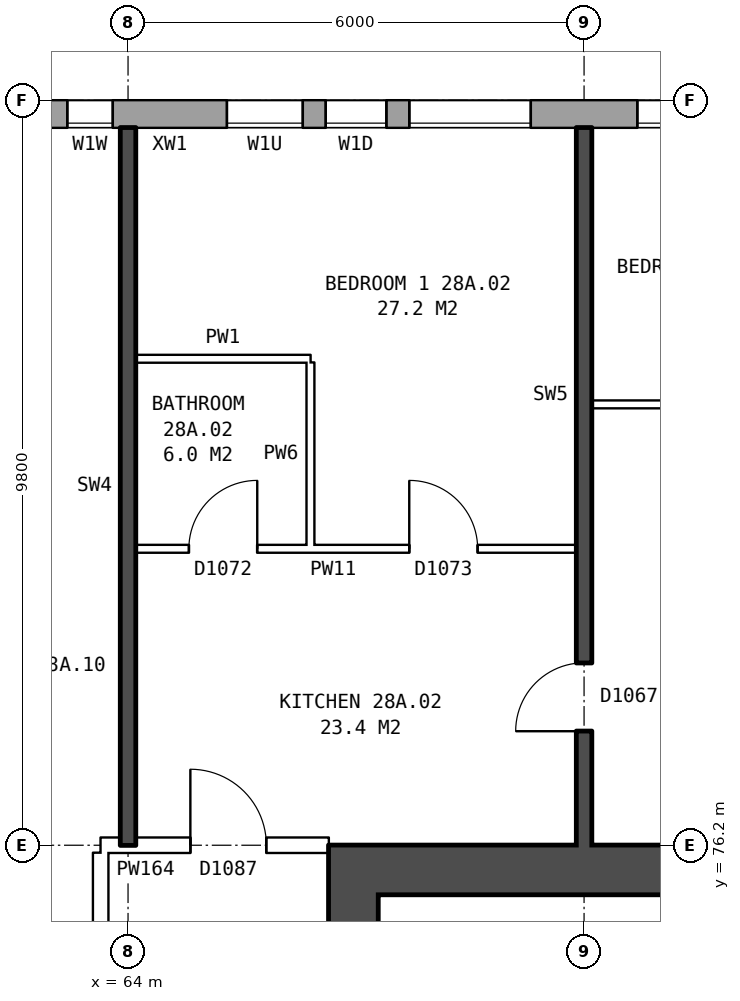
"""IFC4 building model, lengths in metres.
Left out: names, types, materials, properties, quantities, classifications, styles, units other than length and angle.
Written with IfcOpenShell. Run it as: python <this file> out.ifc"""

import sys

from ifc_helpers import new_model, si_unit, direction, frame, frame_2d, origin, place, context, subcontext, project, spatial, rectangle, extrude, element, fill, save


model = new_model("IFC4")
c1 = context("Model", 3, precision=1e-05, world=origin(), true_north=direction((0.0, 1.0)))
c2 = subcontext(c1, "Body", "Model", "MODEL_VIEW")
j1 = project(units=[si_unit("LENGTHUNIT", "METRE"), si_unit("PLANEANGLEUNIT", "RADIAN")], contexts=[c1])
p1 = place(None, origin())
s1 = spatial("IfcSite", under=j1, at=p1, CompositionType="ELEMENT")
p2 = place(p1, origin())
s2 = spatial("IfcBuilding", under=s1, at=p2, CompositionType="ELEMENT")
p3 = place(p2, frame((0.0, 0.0, 102.6)))
s3 = spatial("IfcBuildingStorey", under=s2, at=p3, CompositionType="ELEMENT", Elevation=102.6)
p4 = place(p3, frame((72.925, 85.82, 0.0), z_axis=(0.0, 0.0, 1.0), x_axis=(-1.0, 0.0, 0.0)))
e1 = element("IfcWall", 1, at=p4, inside=s3, PredefinedType="STANDARD", context=c2, shape_type="SweptSolid", body=[
    extrude(rectangle(XDim=44.851, YDim=0.36, at=frame_2d((22.425, 0.0))), origin(), (0.0, 0.0, 1.0), 2.85),
])
p5 = place(p4, frame((0.625, 0.0, 0.8)))
e2 = element("IfcOpeningElement", 2, at=p5, cuts=e1, PredefinedType="OPENING", context=c2, shape_type="SweptSolid", body=[
    extrude(rectangle(XDim=1.6, YDim=1.8, at=frame_2d((0.8, 0.9))), frame((0.0, 0.19, 0.0), z_axis=(0.0, -1.0, 0.0), x_axis=(1.0, 0.0, 0.0)), (0.0, 0.0, 1.0), 0.38),
])
p6 = place(p4, frame((3.625, 0.0, 0.8)))
e3 = element("IfcOpeningElement", 3, at=p6, cuts=e1, PredefinedType="OPENING", context=c2, shape_type="SweptSolid", body=[
    extrude(rectangle(XDim=1.6, YDim=1.8, at=frame_2d((0.8, 0.9))), frame((0.0, 0.19, 0.0), z_axis=(0.0, -1.0, 0.0), x_axis=(1.0, 0.0, 0.0)), (0.0, 0.0, 1.0), 0.38),
])
p7 = place(p4, frame((5.525, 0.0, 0.8)))
e4 = element("IfcOpeningElement", 4, at=p7, cuts=e1, PredefinedType="OPENING", context=c2, shape_type="SweptSolid", body=[
    extrude(rectangle(XDim=0.8, YDim=1.8, at=frame_2d((0.4, 0.9))), frame((0.0, 0.19, 0.0), z_axis=(0.0, -1.0, 0.0), x_axis=(1.0, 0.0, 0.0)), (0.0, 0.0, 1.0), 0.38),
])
p8 = place(p4, frame((9.125, 0.0, 0.8)))
e5 = element("IfcOpeningElement", 5, at=p8, cuts=e1, PredefinedType="OPENING", context=c2, shape_type="SweptSolid", body=[
    extrude(rectangle(XDim=0.6, YDim=0.9, at=frame_2d((0.3, 0.45))), frame((0.0, 0.19, 0.0), z_axis=(0.0, -1.0, 0.0), x_axis=(1.0, 0.0, 0.0)), (0.0, 0.0, 1.0), 0.38),
])
p9 = place(p4, frame((12.625, 0.0, 0.8)))
e6 = element("IfcOpeningElement", 6, at=p9, cuts=e1, PredefinedType="OPENING", context=c2, shape_type="SweptSolid", body=[
    extrude(rectangle(XDim=1.6, YDim=1.8, at=frame_2d((0.8, 0.9))), frame((0.0, 0.19, 0.0), z_axis=(0.0, -1.0, 0.0), x_axis=(1.0, 0.0, 0.0)), (0.0, 0.0, 1.0), 0.38),
])
p10 = place(p4, frame((15.625, 0.0, 0.8)))
e7 = element("IfcOpeningElement", 7, at=p10, cuts=e1, PredefinedType="OPENING", context=c2, shape_type="SweptSolid", body=[
    extrude(rectangle(XDim=1.6, YDim=1.8, at=frame_2d((0.8, 0.9))), frame((0.0, 0.19, 0.0), z_axis=(0.0, -1.0, 0.0), x_axis=(1.0, 0.0, 0.0)), (0.0, 0.0, 1.0), 0.38),
])
p11 = place(p4, frame((18.625, 0.0, 0.8)))
e8 = element("IfcOpeningElement", 8, at=p11, cuts=e1, PredefinedType="OPENING", context=c2, shape_type="SweptSolid", body=[
    extrude(rectangle(XDim=1.6, YDim=1.8, at=frame_2d((0.8, 0.9))), frame((0.0, 0.19, 0.0), z_axis=(0.0, -1.0, 0.0), x_axis=(1.0, 0.0, 0.0)), (0.0, 0.0, 1.0), 0.38),
])
p12 = place(p4, frame((21.625, 0.0, 0.8)))
e9 = element("IfcOpeningElement", 9, at=p12, cuts=e1, PredefinedType="OPENING", context=c2, shape_type="SweptSolid", body=[
    extrude(rectangle(XDim=1.6, YDim=1.8, at=frame_2d((0.8, 0.9))), frame((0.0, 0.19, 0.0), z_axis=(0.0, -1.0, 0.0), x_axis=(1.0, 0.0, 0.0)), (0.0, 0.0, 1.0), 0.38),
])
p13 = place(p4, frame((24.625, 0.0, 0.8)))
e10 = element("IfcOpeningElement", 10, at=p13, cuts=e1, PredefinedType="OPENING", context=c2, shape_type="SweptSolid", body=[
    extrude(rectangle(XDim=1.6, YDim=1.8, at=frame_2d((0.8, 0.9))), frame((0.0, 0.19, 0.0), z_axis=(0.0, -1.0, 0.0), x_axis=(1.0, 0.0, 0.0)), (0.0, 0.0, 1.0), 0.38),
])
p14 = place(p4, frame((27.625, 0.0, 0.8)))
e11 = element("IfcOpeningElement", 11, at=p14, cuts=e1, PredefinedType="OPENING", context=c2, shape_type="SweptSolid", body=[
    extrude(rectangle(XDim=1.6, YDim=1.8, at=frame_2d((0.8, 0.9))), frame((0.0, 0.19, 0.0), z_axis=(0.0, -1.0, 0.0), x_axis=(1.0, 0.0, 0.0)), (0.0, 0.0, 1.0), 0.38),
])
p15 = place(p4, frame((30.625, 0.0, 0.8)))
e12 = element("IfcOpeningElement", 12, at=p15, cuts=e1, PredefinedType="OPENING", context=c2, shape_type="SweptSolid", body=[
    extrude(rectangle(XDim=1.6, YDim=1.8, at=frame_2d((0.8, 0.9))), frame((0.0, 0.19, 0.0), z_axis=(0.0, -1.0, 0.0), x_axis=(1.0, 0.0, 0.0)), (0.0, 0.0, 1.0), 0.38),
])
p16 = place(p4, frame((33.125, 0.0, 0.8)))
e13 = element("IfcOpeningElement", 13, at=p16, cuts=e1, PredefinedType="OPENING", context=c2, shape_type="SweptSolid", body=[
    extrude(rectangle(XDim=1.4, YDim=1.8, at=frame_2d((0.7, 0.9))), frame((0.0, 0.19, 0.0), z_axis=(0.0, -1.0, 0.0), x_axis=(1.0, 0.0, 0.0)), (0.0, 0.0, 1.0), 0.38),
])
p17 = place(p4, frame((34.825, 0.0, 0.8)))
e14 = element("IfcOpeningElement", 14, at=p17, cuts=e1, PredefinedType="OPENING", context=c2, shape_type="SweptSolid", body=[
    extrude(rectangle(XDim=1.0, YDim=0.9, at=frame_2d((0.5, 0.45))), frame((0.0, 0.19, 0.0), z_axis=(0.0, -1.0, 0.0), x_axis=(1.0, 0.0, 0.0)), (0.0, 0.0, 1.0), 0.38),
])
p18 = place(p4, frame((39.625, 0.0, 0.8)))
e15 = element("IfcOpeningElement", 15, at=p18, cuts=e1, PredefinedType="OPENING", context=c2, shape_type="SweptSolid", body=[
    extrude(rectangle(XDim=1.6, YDim=1.8, at=frame_2d((0.8, 0.9))), frame((0.0, 0.19, 0.0), z_axis=(0.0, -1.0, 0.0), x_axis=(1.0, 0.0, 0.0)), (0.0, 0.0, 1.0), 0.38),
])
p19 = place(p4, frame((42.625, 0.0, 0.8)))
e16 = element("IfcOpeningElement", 16, at=p19, cuts=e1, PredefinedType="OPENING", context=c2, shape_type="SweptSolid", body=[
    extrude(rectangle(XDim=1.6, YDim=1.8, at=frame_2d((0.8, 0.9))), frame((0.0, 0.19, 0.0), z_axis=(0.0, -1.0, 0.0), x_axis=(1.0, 0.0, 0.0)), (0.0, 0.0, 1.0), 0.38),
])
p20 = place(p4, frame((6.625, 0.0, 1.7)))
e17 = element("IfcOpeningElement", 17, at=p20, cuts=e1, PredefinedType="OPENING", context=c2, shape_type="SweptSolid", body=[
    extrude(rectangle(XDim=1.0, YDim=0.9, at=frame_2d((0.5, 0.45))), frame((0.0, 0.19, 0.0), z_axis=(0.0, -1.0, 0.0), x_axis=(1.0, 0.0, 0.0)), (0.0, 0.0, 1.0), 0.38),
])
p21 = place(p4, frame((10.175, 0.0, 0.8)))
e18 = element("IfcOpeningElement", 18, at=p21, cuts=e1, PredefinedType="OPENING", context=c2, shape_type="SweptSolid", body=[
    extrude(rectangle(XDim=1.6, YDim=1.8, at=frame_2d((0.8, 0.9))), frame((0.0, 0.19, 0.0), z_axis=(0.0, -1.0, 0.0), x_axis=(1.0, 0.0, 0.0)), (0.0, 0.0, 1.0), 0.38),
])
p22 = place(p4, frame((37.175, 0.0, 1.7)))
e19 = element("IfcOpeningElement", 19, at=p22, cuts=e1, PredefinedType="OPENING", context=c2, shape_type="SweptSolid", body=[
    extrude(rectangle(XDim=0.6, YDim=0.9, at=frame_2d((0.3, 0.45))), frame((0.0, 0.19, 0.0), z_axis=(0.0, -1.0, 0.0), x_axis=(1.0, 0.0, 0.0)), (0.0, 0.0, 1.0), 0.38),
])
p23 = place(p4, frame((38.075, 0.0, 1.1)))
e20 = element("IfcOpeningElement", 20, at=p23, cuts=e1, PredefinedType="OPENING", context=c2, shape_type="SweptSolid", body=[
    extrude(rectangle(XDim=0.6, YDim=1.5, at=frame_2d((0.3, 0.75))), frame((0.0, 0.19, 0.0), z_axis=(0.0, -1.0, 0.0), x_axis=(1.0, 0.0, 0.0)), (0.0, 0.0, 1.0), 0.38),
])
p24 = place(p3, frame((66.965, 64.45, 0.0), z_axis=(0.0, 0.0, 1.0), x_axis=(0.0, 1.0, 0.0)))
e21 = element("IfcWall", 21, at=p24, inside=s3, PredefinedType="SHEAR", context=c2, shape_type="SweptSolid", body=[
    extrude(rectangle(XDim=11.1, YDim=0.65, at=frame_2d((5.55, 0.0))), origin(), (0.0, 0.0, 1.0), 2.85),
])
p25 = place(p24, frame((0.675, 0.0, 0.0)))
e22 = element("IfcOpeningElement", 22, at=p25, cuts=e21, PredefinedType="OPENING", context=c2, shape_type="SweptSolid", body=[
    extrude(rectangle(XDim=1.1, YDim=2.1, at=frame_2d((0.55, 1.05))), frame((0.0, 0.335, 0.0), z_axis=(0.0, -1.0, 0.0), x_axis=(1.0, 0.0, 0.0)), (0.0, 0.0, 1.0), 0.67),
])
p26 = place(p24, frame((9.25, 0.0, 0.0)))
e23 = element("IfcOpeningElement", 23, at=p26, cuts=e21, PredefinedType="OPENING", context=c2, shape_type="SweptSolid", body=[
    extrude(rectangle(XDim=1.1, YDim=2.1, at=frame_2d((0.55, 1.05))), frame((0.0, 0.335, 0.0), z_axis=(0.0, -1.0, 0.0), x_axis=(1.0, 0.0, 0.0)), (0.0, 0.0, 1.0), 0.67),
])
p27 = place(p3, frame((66.64, 75.875, 0.0), z_axis=(0.0, 0.0, 1.0), x_axis=(1.0, 0.0, 0.0)))
e24 = element("IfcWall", 24, at=p27, inside=s3, PredefinedType="SHEAR", context=c2, shape_type="SweptSolid", body=[
    extrude(rectangle(XDim=9.0, YDim=0.65, at=frame_2d((4.5, 0.0))), origin(), (0.0, 0.0, 1.0), 2.85),
])
p28 = place(p3, frame((63.64, 63.9, 0.0), z_axis=(0.0, 0.0, 1.0), x_axis=(0.0, 1.0, 0.0)))
e25 = element("IfcWall", 25, at=p28, inside=s3, PredefinedType="PARTITIONING", context=c2, shape_type="SweptSolid", body=[
    extrude(rectangle(XDim=12.2, YDim=0.2, at=frame_2d((6.1, 0.0))), origin(), (0.0, 0.0, 1.0), 2.85),
])
p29 = place(p28, frame((5.1, 0.0, 0.0)))
e26 = element("IfcOpeningElement", 26, at=p29, cuts=e25, PredefinedType="OPENING", context=c2, shape_type="SweptSolid", body=[
    extrude(rectangle(XDim=2.0, YDim=2.1, at=frame_2d((1.0, 1.05))), frame((0.0, 0.11, 0.0), z_axis=(0.0, -1.0, 0.0), x_axis=(1.0, 0.0, 0.0)), (0.0, 0.0, 1.0), 0.22),
])
p30 = place(p3, frame((63.64, 76.2, 0.0), z_axis=(0.0, 0.0, 1.0), x_axis=(1.0, 0.0, 0.0)))
e27 = element("IfcWall", 27, at=p30, inside=s3, PredefinedType="PARTITIONING", context=c2, shape_type="SweptSolid", body=[
    extrude(rectangle(XDim=3.0, YDim=0.2, at=frame_2d((1.5, 0.0))), origin(), (0.0, 0.0, 1.0), 2.85),
])
p31 = place(p30, frame((1.18, 0.0, 0.0)))
e28 = element("IfcOpeningElement", 28, at=p31, cuts=e27, PredefinedType="OPENING", context=c2, shape_type="SweptSolid", body=[
    extrude(rectangle(XDim=1.0, YDim=2.1, at=frame_2d((0.5, 1.05))), frame((0.0, 0.11, 0.0), z_axis=(0.0, -1.0, 0.0), x_axis=(1.0, 0.0, 0.0)), (0.0, 0.0, 1.0), 0.22),
])
p32 = place(p3, frame((64.1, 80.1, 0.0), z_axis=(0.0, 0.0, 1.0), x_axis=(1.0, 0.0, 0.0)))
e29 = element("IfcWall", 29, at=p32, inside=s3, PredefinedType="PARTITIONING", context=c2, shape_type="SweptSolid", body=[
    extrude(rectangle(XDim=5.8, YDim=0.1, at=frame_2d((2.9, 0.0))), origin(), (0.0, 0.0, 1.0), 2.85),
])
p33 = place(p32, frame((3.6, 0.0, 0.0)))
e30 = element("IfcOpeningElement", 30, at=p33, cuts=e29, PredefinedType="OPENING", context=c2, shape_type="SweptSolid", body=[
    extrude(rectangle(XDim=0.9, YDim=2.1, at=frame_2d((0.45, 1.05))), frame((0.0, 0.06, 0.0), z_axis=(0.0, -1.0, 0.0), x_axis=(1.0, 0.0, 0.0)), (0.0, 0.0, 1.0), 0.12),
])
p34 = place(p32, frame((0.7, 0.0, 0.0)))
e31 = element("IfcOpeningElement", 31, at=p34, cuts=e29, PredefinedType="OPENING", context=c2, shape_type="SweptSolid", body=[
    extrude(rectangle(XDim=0.9, YDim=2.1, at=frame_2d((0.45, 1.05))), frame((0.0, 0.06, 0.0), z_axis=(0.0, -1.0, 0.0), x_axis=(1.0, 0.0, 0.0)), (0.0, 0.0, 1.0), 0.12),
])
p35 = place(p3, frame((70.1, 82.0, 0.0), z_axis=(0.0, 0.0, 1.0), x_axis=(1.0, 0.0, 0.0)))
e32 = element("IfcWall", 32, at=p35, inside=s3, PredefinedType="PARTITIONING", context=c2, shape_type="SweptSolid", body=[
    extrude(rectangle(XDim=5.54, YDim=0.1, at=frame_2d((2.77, 0.0))), origin(), (0.0, 0.0, 1.0), 2.85),
])
p36 = place(p35, frame((2.32, 0.0, 0.0)))
e33 = element("IfcOpeningElement", 33, at=p36, cuts=e32, PredefinedType="OPENING", context=c2, shape_type="SweptSolid", body=[
    extrude(rectangle(XDim=0.9, YDim=2.1, at=frame_2d((0.45, 1.05))), frame((0.0, 0.06, 0.0), z_axis=(0.0, -1.0, 0.0), x_axis=(1.0, 0.0, 0.0)), (0.0, 0.0, 1.0), 0.12),
])
p37 = place(p3, frame((64.1, 82.6, 0.0), z_axis=(0.0, 0.0, 1.0), x_axis=(1.0, 0.0, 0.0)))
e34 = element("IfcWall", 34, at=p37, inside=s3, PredefinedType="PARTITIONING", context=c2, shape_type="SweptSolid", body=[
    extrude(rectangle(XDim=2.3, YDim=0.1, at=frame_2d((1.15, 0.0))), origin(), (0.0, 0.0, 1.0), 2.85),
])
p38 = place(p3, frame((64.0, 76.2, 0.0), z_axis=(0.0, 0.0, 1.0), x_axis=(0.0, 1.0, 0.0)))
e35 = element("IfcWall", 35, at=p38, inside=s3, PredefinedType="SOLIDWALL", context=c2, shape_type="SweptSolid", body=[
    extrude(rectangle(XDim=9.44, YDim=0.2, at=frame_2d((4.72, 0.0))), origin(), (0.0, 0.0, 1.0), 2.85),
])
p39 = place(p3, frame((66.4, 80.15, 0.0), z_axis=(0.0, 0.0, 1.0), x_axis=(0.0, 1.0, 0.0)))
e36 = element("IfcWall", 36, at=p39, inside=s3, PredefinedType="PARTITIONING", context=c2, shape_type="SweptSolid", body=[
    extrude(rectangle(XDim=2.4, YDim=0.1, at=frame_2d((1.2, 0.0))), origin(), (0.0, 0.0, 1.0), 2.85),
])
p40 = place(p3, frame((70.0, 76.2, 0.0), z_axis=(0.0, 0.0, 1.0), x_axis=(0.0, 1.0, 0.0)))
e37 = element("IfcWall", 37, at=p40, inside=s3, PredefinedType="SOLIDWALL", context=c2, shape_type="SweptSolid", body=[
    extrude(rectangle(XDim=9.44, YDim=0.2, at=frame_2d((4.72, 0.0))), origin(), (0.0, 0.0, 1.0), 2.85),
])
p41 = place(p40, frame((1.5, 0.0, 0.0)))
e38 = element("IfcOpeningElement", 38, at=p41, cuts=e37, PredefinedType="OPENING", context=c2, shape_type="SweptSolid", body=[
    extrude(rectangle(XDim=0.9, YDim=2.1, at=frame_2d((0.45, 1.05))), frame((0.0, 0.11, 0.0), z_axis=(0.0, -1.0, 0.0), x_axis=(1.0, 0.0, 0.0)), (0.0, 0.0, 1.0), 0.22),
])
p42 = place(p5, origin())
e39 = element("IfcWindow", 39, at=p42, inside=s3, PartitioningType="SINGLE_PANEL", PredefinedType="WINDOW", context=c2, shape_type="SweptSolid", body=[
    extrude(rectangle(XDim=1.6, YDim=1.8, at=frame_2d((0.8, 0.9))), frame((0.0, 0.15, 0.0), z_axis=(0.0, -1.0, 0.0), x_axis=(1.0, 0.0, 0.0)), (0.0, 0.0, 1.0), 0.06),
])
fill(e2, e39)
p43 = place(p6, origin())
e40 = element("IfcWindow", 40, at=p43, inside=s3, PartitioningType="SINGLE_PANEL", PredefinedType="WINDOW", context=c2, shape_type="SweptSolid", body=[
    extrude(rectangle(XDim=1.6, YDim=1.8, at=frame_2d((0.8, 0.9))), frame((0.0, 0.15, 0.0), z_axis=(0.0, -1.0, 0.0), x_axis=(1.0, 0.0, 0.0)), (0.0, 0.0, 1.0), 0.06),
])
fill(e3, e40)
p44 = place(p7, origin())
e41 = element("IfcWindow", 41, at=p44, inside=s3, PartitioningType="SINGLE_PANEL", PredefinedType="WINDOW", context=c2, shape_type="SweptSolid", body=[
    extrude(rectangle(XDim=0.8, YDim=1.8, at=frame_2d((0.4, 0.9))), frame((0.0, 0.15, 0.0), z_axis=(0.0, -1.0, 0.0), x_axis=(1.0, 0.0, 0.0)), (0.0, 0.0, 1.0), 0.06),
])
fill(e4, e41)
p45 = place(p8, origin())
e42 = element("IfcWindow", 42, at=p45, inside=s3, PartitioningType="SINGLE_PANEL", PredefinedType="WINDOW", context=c2, shape_type="SweptSolid", body=[
    extrude(rectangle(XDim=0.6, YDim=0.9, at=frame_2d((0.3, 0.45))), frame((0.0, 0.15, 0.0), z_axis=(0.0, -1.0, 0.0), x_axis=(1.0, 0.0, 0.0)), (0.0, 0.0, 1.0), 0.06),
])
fill(e5, e42)
p46 = place(p33, origin())
e43 = element("IfcDoor", 43, at=p46, inside=s3, OperationType="SINGLE_SWING_LEFT", PredefinedType="DOOR", context=c2, shape_type="SweptSolid", body=[
    extrude(rectangle(XDim=0.9, YDim=2.1, at=frame_2d((0.45, 1.05))), frame((0.0, 0.025, 0.0), z_axis=(0.0, -1.0, 0.0), x_axis=(1.0, 0.0, 0.0)), (0.0, 0.0, 1.0), 0.05),
])
fill(e30, e43)
p47 = place(p31, origin())
e44 = element("IfcDoor", 44, at=p47, inside=s3, OperationType="SINGLE_SWING_LEFT", PredefinedType="DOOR", context=c2, shape_type="SweptSolid", body=[
    extrude(rectangle(XDim=1.0, YDim=2.1, at=frame_2d((0.5, 1.05))), frame((0.0, 0.025, 0.0), z_axis=(0.0, -1.0, 0.0), x_axis=(1.0, 0.0, 0.0)), (0.0, 0.0, 1.0), 0.05),
])
fill(e28, e44)
p48 = place(p41, origin())
e45 = element("IfcDoor", 45, at=p48, inside=s3, OperationType="SINGLE_SWING_LEFT", PredefinedType="DOOR", context=c2, shape_type="SweptSolid", body=[
    extrude(rectangle(XDim=0.9, YDim=2.1, at=frame_2d((0.45, 1.05))), frame((0.0, 0.025, 0.0), z_axis=(0.0, -1.0, 0.0), x_axis=(1.0, 0.0, 0.0)), (0.0, 0.0, 1.0), 0.05),
])
fill(e38, e45)
p49 = place(p34, origin())
e46 = element("IfcDoor", 46, at=p49, inside=s3, OperationType="SINGLE_SWING_RIGHT", PredefinedType="DOOR", context=c2, shape_type="SweptSolid", body=[
    extrude(rectangle(XDim=0.9, YDim=2.1, at=frame_2d((0.45, 1.05))), frame((0.0, 0.025, 0.0), z_axis=(0.0, -1.0, 0.0), x_axis=(1.0, 0.0, 0.0)), (0.0, 0.0, 1.0), 0.05),
])
fill(e31, e46)
p50 = place(p20, origin())
e47 = element("IfcWindow", 47, at=p50, inside=s3, PartitioningType="SINGLE_PANEL", PredefinedType="WINDOW", context=c2, shape_type="SweptSolid", body=[
    extrude(rectangle(XDim=1.0, YDim=0.9, at=frame_2d((0.5, 0.45))), frame((0.0, 0.15, 0.0), z_axis=(0.0, -1.0, 0.0), x_axis=(1.0, 0.0, 0.0)), (0.0, 0.0, 1.0), 0.06),
])
fill(e17, e47)
save(model, sys.argv[1])
